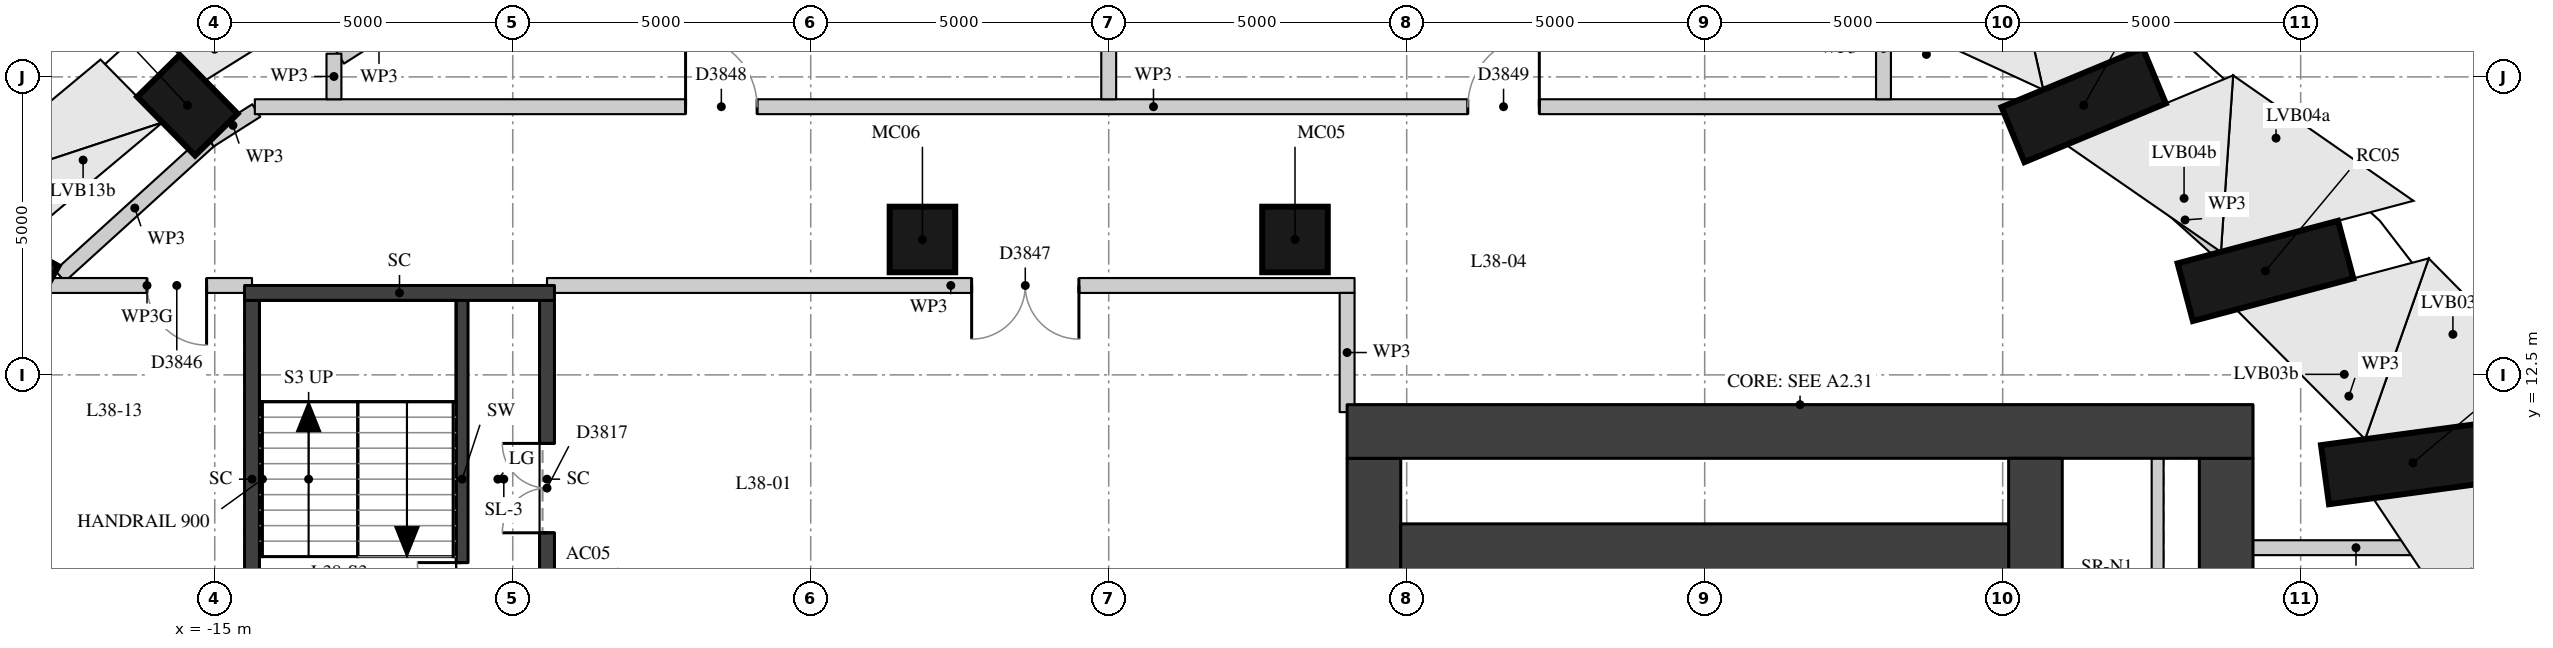
"""IFC4 building model, lengths in metres.
Left out: names, types, materials, properties, quantities, classifications, styles, units other than length and angle.
Written with IfcOpenShell. Run it as: python <this file> out.ifc"""

import sys

from ifc_helpers import new_model, si_unit, direction, frame, frame_2d, origin, origin_2d, place, context, subcontext, project, spatial, rectangle, extrude, element, fill, save


model = new_model("IFC4")
c1 = context("Model", 3, precision=1e-05, world=origin(), true_north=direction((0.0, 1.0)))
c2 = subcontext(c1, "Body", "Model", "MODEL_VIEW")
j1 = project(units=[si_unit("LENGTHUNIT", "METRE"), si_unit("PLANEANGLEUNIT", "RADIAN")], contexts=[c1])
p1 = place(None, origin())
s1 = spatial("IfcSite", under=j1, at=p1, CompositionType="ELEMENT")
p2 = place(p1, origin())
s2 = spatial("IfcBuilding", under=s1, at=p2, CompositionType="ELEMENT")
p3 = place(p2, frame((0.0, 0.0, 135.1)))
s3 = spatial("IfcBuildingStorey", under=s2, at=p3, CompositionType="ELEMENT", Elevation=135.1)
p4 = place(p3, frame((23.36, 11.225, 0.483), z_axis=(-0.638714852025, -0.08658839061, 0.764555941978), x_axis=(0.757625702782, 0.102708728442, 0.644557376489)))
e1 = element("IfcColumn", 1, at=p4, inside=s3, PredefinedType="COLUMN", context=c2, shape_type="SweptSolid", body=[
    extrude(rectangle(XDim=1.5, YDim=1.0, at=origin_2d()), origin(), (0.0, 0.0, 1.0), 4.621),
])
p5 = place(p3, frame((20.755, 14.602, 0.46), z_axis=(-0.593567438893, -0.157530913941, 0.789215880883), x_axis=(0.7628085794, 0.202446975358, 0.614115863141)))
e2 = element("IfcColumn", 2, at=p5, inside=s3, PredefinedType="COLUMN", context=c2, shape_type="SweptSolid", body=[
    extrude(rectangle(XDim=1.5, YDim=1.0, at=origin_2d()), origin(), (0.0, 0.0, 1.0), 4.535),
])
p6 = place(p3, frame((17.545, 17.517, 0.433), z_axis=(-0.532872454376, -0.221367276167, 0.816727296232), x_axis=(0.754234818577, 0.313326211568, 0.577023850105)))
e3 = element("IfcColumn", 3, at=p6, inside=s3, PredefinedType="COLUMN", context=c2, shape_type="SweptSolid", body=[
    extrude(rectangle(XDim=1.5, YDim=1.0, at=origin_2d()), origin(), (0.0, 0.0, 1.0), 4.45),
])
p7 = place(p3, frame((13.825, 19.882, 0.4), z_axis=(-0.457164324524, -0.275515169699, 0.845631226746), x_axis=(0.724271094402, 0.436490038216, 0.533767578962)))
e4 = element("IfcColumn", 4, at=p7, inside=s3, PredefinedType="COLUMN", context=c2, shape_type="SweptSolid", body=[
    extrude(rectangle(XDim=1.5, YDim=1.0, at=origin_2d()), origin(), (0.0, 0.0, 1.0), 4.375),
])
p8 = place(p3, frame((-12.225, 19.882, 0.238), z_axis=(0.141417418826, -0.284043041801, 0.948325188982), x_axis=(-0.422658902725, 0.848928805027, 0.317300072397)))
e5 = element("IfcColumn", 5, at=p8, inside=s3, PredefinedType="COLUMN", context=c2, shape_type="SweptSolid", body=[
    extrude(rectangle(XDim=1.5, YDim=1.0, at=origin_2d()), origin(), (0.0, 0.0, 1.0), 4.243),
])
p9 = place(p3, frame((-15.945, 17.517, 0.244), z_axis=(0.228901450593, -0.232181335632, 0.945354935091), x_axis=(-0.663694994095, 0.673204952532, 0.326043013572)))
e6 = element("IfcColumn", 6, at=p9, inside=s3, PredefinedType="COLUMN", context=c2, shape_type="SweptSolid", body=[
    extrude(rectangle(XDim=1.5, YDim=1.0, at=origin_2d()), origin(), (0.0, 0.0, 1.0), 4.243),
])
p10 = place(p3, frame((-19.156, 14.602, 0.261), z_axis=(0.304420915631, -0.168349196586, 0.937542774563), x_axis=(-0.820443324529, 0.453717098388, 0.347870012886)))
e7 = element("IfcColumn", 7, at=p10, inside=s3, PredefinedType="COLUMN", context=c2, shape_type="SweptSolid", body=[
    extrude(rectangle(XDim=1.5, YDim=1.0, at=origin_2d()), origin(), (0.0, 0.0, 1.0), 4.243),
])
for number, where, z_axis, x_axis in (
    (8, (3.126, 14.772, 0.0), (0.0, 0.0, 1.0), (1.0, 0.0, 0.0)),
    (9, (-3.126, 14.772, 0.0), (0.0, 0.0, 1.0), (1.0, 0.0, 0.0)),
):
    element("IfcColumn", number, at=place(p3, frame(where, z_axis=z_axis, x_axis=x_axis)), inside=s3, PredefinedType="COLUMN", context=c2, shape_type="SweptSolid", body=[
        extrude(rectangle(XDim=1.1, YDim=1.1, at=origin_2d()), origin(), (0.0, 0.0, 1.0), 4.5),
    ])
p11 = place(p3, frame((4.45, -11.1, 0.0), z_axis=(0.0, 0.0, 1.0), x_axis=(0.0, 1.0, 0.0)))
e10 = element("IfcWall", 10, at=p11, inside=s3, PredefinedType="SHEAR", context=c2, shape_type="SweptSolid", body=[
    extrude(rectangle(XDim=22.2, YDim=0.9, at=frame_2d((11.1, 0.0))), origin(), (0.0, 0.0, 1.0), 4.09),
])
p12 = place(p11, frame((2.35, 0.0, 0.0)))
e11 = element("IfcOpeningElement", 11, at=p12, cuts=e10, PredefinedType="OPENING", context=c2, shape_type="SweptSolid", body=[
    extrude(rectangle(XDim=1.5, YDim=2.1, at=frame_2d((0.75, 1.05))), frame((0.0, 0.46, 0.0), z_axis=(0.0, -1.0, 0.0), x_axis=(1.0, 0.0, 0.0)), (0.0, 0.0, 1.0), 0.92),
])
p13 = place(p11, frame((5.45, 0.0, 0.0)))
e12 = element("IfcOpeningElement", 12, at=p13, cuts=e10, PredefinedType="OPENING", context=c2, shape_type="SweptSolid", body=[
    extrude(rectangle(XDim=1.8, YDim=2.1, at=frame_2d((0.9, 1.05))), frame((0.0, 0.46, 0.0), z_axis=(0.0, -1.0, 0.0), x_axis=(1.0, 0.0, 0.0)), (0.0, 0.0, 1.0), 0.92),
])
p14 = place(p11, frame((7.95, 0.0, 0.0)))
e13 = element("IfcOpeningElement", 13, at=p14, cuts=e10, PredefinedType="OPENING", context=c2, shape_type="SweptSolid", body=[
    extrude(rectangle(XDim=1.1, YDim=2.1, at=frame_2d((0.55, 1.05))), frame((0.0, 0.46, 0.0), z_axis=(0.0, -1.0, 0.0), x_axis=(1.0, 0.0, 0.0)), (0.0, 0.0, 1.0), 0.92),
])
p15 = place(p11, frame((10.6, 0.0, 0.0)))
e14 = element("IfcOpeningElement", 14, at=p15, cuts=e10, PredefinedType="OPENING", context=c2, shape_type="SweptSolid", body=[
    extrude(rectangle(XDim=1.0, YDim=2.1, at=frame_2d((0.5, 1.05))), frame((0.0, 0.46, 0.0), z_axis=(0.0, -1.0, 0.0), x_axis=(1.0, 0.0, 0.0)), (0.0, 0.0, 1.0), 0.92),
])
p16 = place(p11, frame((13.15, 0.0, 0.0)))
e15 = element("IfcOpeningElement", 15, at=p16, cuts=e10, PredefinedType="OPENING", context=c2, shape_type="SweptSolid", body=[
    extrude(rectangle(XDim=1.1, YDim=2.1, at=frame_2d((0.55, 1.05))), frame((0.0, 0.46, 0.0), z_axis=(0.0, -1.0, 0.0), x_axis=(1.0, 0.0, 0.0)), (0.0, 0.0, 1.0), 0.92),
])
p17 = place(p11, frame((14.95, 0.0, 0.0)))
e16 = element("IfcOpeningElement", 16, at=p17, cuts=e10, PredefinedType="OPENING", context=c2, shape_type="SweptSolid", body=[
    extrude(rectangle(XDim=1.8, YDim=2.1, at=frame_2d((0.9, 1.05))), frame((0.0, 0.46, 0.0), z_axis=(0.0, -1.0, 0.0), x_axis=(1.0, 0.0, 0.0)), (0.0, 0.0, 1.0), 0.92),
])
p18 = place(p11, frame((18.35, 0.0, 0.0)))
e17 = element("IfcOpeningElement", 17, at=p18, cuts=e10, PredefinedType="OPENING", context=c2, shape_type="SweptSolid", body=[
    extrude(rectangle(XDim=1.5, YDim=2.1, at=frame_2d((0.75, 1.05))), frame((0.0, 0.46, 0.0), z_axis=(0.0, -1.0, 0.0), x_axis=(1.0, 0.0, 0.0)), (0.0, 0.0, 1.0), 0.92),
])
p19 = place(p3, frame((18.75, -11.1, 0.0), z_axis=(0.0, 0.0, 1.0), x_axis=(0.0, 1.0, 0.0)))
e18 = element("IfcWall", 18, at=p19, inside=s3, PredefinedType="SHEAR", context=c2, shape_type="SweptSolid", body=[
    extrude(rectangle(XDim=22.2, YDim=0.9, at=frame_2d((11.1, 0.0))), origin(), (0.0, 0.0, 1.0), 4.09),
])
p20 = place(p3, frame((4.0, 11.55, 0.0), z_axis=(0.0, 0.0, 1.0), x_axis=(1.0, 0.0, 0.0)))
e19 = element("IfcWall", 19, at=p20, inside=s3, PredefinedType="SHEAR", context=c2, shape_type="SweptSolid", body=[
    extrude(rectangle(XDim=15.2, YDim=0.9, at=frame_2d((7.6, 0.0))), origin(), (0.0, 0.0, 1.0), 4.09),
])
p21 = place(p3, frame((15.55, -11.1, 0.0), z_axis=(0.0, 0.0, 1.0), x_axis=(0.0, 1.0, 0.0)))
e20 = element("IfcWall", 20, at=p21, inside=s3, PredefinedType="SHEAR", context=c2, shape_type="SweptSolid", body=[
    extrude(rectangle(XDim=22.2, YDim=0.9, at=frame_2d((11.1, 0.0))), origin(), (0.0, 0.0, 1.0), 4.09),
])
p22 = place(p21, frame((15.6, 0.0, 0.0)))
e21 = element("IfcOpeningElement", 21, at=p22, cuts=e20, PredefinedType="OPENING", context=c2, shape_type="SweptSolid", body=[
    extrude(rectangle(XDim=1.0, YDim=2.1, at=frame_2d((0.5, 1.05))), frame((0.0, 0.46, 0.0), z_axis=(0.0, -1.0, 0.0), x_axis=(1.0, 0.0, 0.0)), (0.0, 0.0, 1.0), 0.92),
])
p23 = place(p21, frame((5.6, 0.0, 0.0)))
e22 = element("IfcOpeningElement", 22, at=p23, cuts=e20, PredefinedType="OPENING", context=c2, shape_type="SweptSolid", body=[
    extrude(rectangle(XDim=1.0, YDim=2.1, at=frame_2d((0.5, 1.05))), frame((0.0, 0.46, 0.0), z_axis=(0.0, -1.0, 0.0), x_axis=(1.0, 0.0, 0.0)), (0.0, 0.0, 1.0), 0.92),
])
p24 = place(p3, frame((4.9, 9.55, 0.0), z_axis=(0.0, 0.0, 1.0), x_axis=(1.0, 0.0, 0.0)))
e23 = element("IfcWall", 23, at=p24, inside=s3, PredefinedType="SHEAR", context=c2, shape_type="SweptSolid", body=[
    extrude(rectangle(XDim=10.2, YDim=0.9, at=frame_2d((5.1, 0.0))), origin(), (0.0, 0.0, 1.0), 4.09),
])
p25 = place(p3, frame((-10.85, 7.75, 0.0), z_axis=(0.0, 0.0, 1.0), x_axis=(0.0, 1.0, 0.0)))
e24 = element("IfcWall", 24, at=p25, inside=s3, PredefinedType="SHEAR", context=c2, shape_type="SweptSolid", body=[
    extrude(rectangle(XDim=6.0, YDim=0.2, at=frame_2d((3.0, 0.0))), origin(), (0.0, 0.0, 1.0), 4.09),
])
p26 = place(p25, frame((0.1, 0.0, 0.0)))
e25 = element("IfcOpeningElement", 25, at=p26, cuts=e24, PredefinedType="OPENING", context=c2, shape_type="SweptSolid", body=[
    extrude(rectangle(XDim=1.5, YDim=2.1, at=frame_2d((0.75, 1.05))), frame((0.0, 0.11, 0.0), z_axis=(0.0, -1.0, 0.0), x_axis=(1.0, 0.0, 0.0)), (0.0, 0.0, 1.0), 0.22),
])
p27 = place(p3, frame((17.6, 6.4, 0.0), z_axis=(0.0, 0.0, 1.0), x_axis=(0.0, 1.0, 0.0)))
e26 = element("IfcWall", 26, at=p27, inside=s3, PredefinedType="PARTITIONING", context=c2, shape_type="SweptSolid", body=[
    extrude(rectangle(XDim=4.7, YDim=0.2, at=frame_2d((2.35, 0.0))), origin(), (0.0, 0.0, 1.0), 4.09),
])
p28 = place(p3, frame((-14.375, 7.75, -0.45), z_axis=(0.0, 0.0, 1.0), x_axis=(0.0, 1.0, 0.0)))
e27 = element("IfcWall", 27, at=p28, inside=s3, PredefinedType="SHEAR", context=c2, shape_type="SweptSolid", body=[
    extrude(rectangle(XDim=6.0, YDim=0.25, at=frame_2d((3.0, 0.0))), origin(), (0.0, 0.0, 1.0), 4.54),
])
p29 = place(p3, frame((-9.425, 7.75, -0.45), z_axis=(0.0, 0.0, 1.0), x_axis=(0.0, 1.0, 0.0)))
e28 = element("IfcWall", 28, at=p29, inside=s3, PredefinedType="SHEAR", context=c2, shape_type="SweptSolid", body=[
    extrude(rectangle(XDim=6.0, YDim=0.25, at=frame_2d((3.0, 0.0))), origin(), (0.0, 0.0, 1.0), 4.54),
])
p30 = place(p29, frame((2.1, 0.0, 0.45)))
e29 = element("IfcOpeningElement", 29, at=p30, cuts=e28, PredefinedType="OPENING", context=c2, shape_type="SweptSolid", body=[
    extrude(rectangle(XDim=1.5, YDim=2.1, at=frame_2d((0.75, 1.05))), frame((0.0, 0.135, 0.0), z_axis=(0.0, -1.0, 0.0), x_axis=(1.0, 0.0, 0.0)), (0.0, 0.0, 1.0), 0.27),
])
p31 = place(p3, frame((-14.5, 13.875, -0.45), z_axis=(0.0, 0.0, 1.0), x_axis=(1.0, 0.0, 0.0)))
e30 = element("IfcWall", 30, at=p31, inside=s3, PredefinedType="SHEAR", context=c2, shape_type="SweptSolid", body=[
    extrude(rectangle(XDim=5.2, YDim=0.25, at=frame_2d((2.6, 0.0))), origin(), (0.0, 0.0, 1.0), 4.54),
])
p32 = place(p3, frame((-15.086, 16.438, 0.0), z_axis=(0.0, 0.0, 1.0), x_axis=(-0.740584857479, -0.671962847836, 0.0)))
e31 = element("IfcWall", 31, at=p32, inside=s3, PredefinedType="PARTITIONING", context=c2, shape_type="SweptSolid", body=[
    extrude(rectangle(XDim=3.391, YDim=0.25, at=frame_2d((1.695, 0.0))), origin(), (0.0, 0.0, 1.0), 4.09),
])
p33 = place(p3, frame((-14.303, 16.936, 0.0), z_axis=(0.0, 0.0, 1.0), x_axis=(-0.843921523767, -0.536466645489, 0.0)))
e32 = element("IfcWall", 32, at=p33, inside=s3, PredefinedType="PARTITIONING", context=c2, shape_type="SweptSolid", body=[
    extrude(rectangle(XDim=0.927, YDim=0.25, at=frame_2d((0.464, 0.0))), origin(), (0.0, 0.0, 1.0), 4.09),
])
p34 = place(p3, frame((19.579, 13.729, 0.0), z_axis=(0.0, 0.0, 1.0), x_axis=(-0.742177331878, 0.670203557172, 0.0)))
e33 = element("IfcWall", 33, at=p34, inside=s3, PredefinedType="PARTITIONING", context=c2, shape_type="SweptSolid", body=[
    extrude(rectangle(XDim=4.091, YDim=0.25, at=frame_2d((2.045, 0.0))), origin(), (0.0, 0.0, 1.0), 4.09),
])
p35 = place(p3, frame((22.039, 10.556, 0.0), z_axis=(0.0, 0.0, 1.0), x_axis=(-0.612824294298, 0.79021920017, 0.0)))
e34 = element("IfcWall", 34, at=p35, inside=s3, PredefinedType="PARTITIONING", context=c2, shape_type="SweptSolid", body=[
    extrude(rectangle(XDim=4.015, YDim=0.25, at=frame_2d((2.007, 0.0))), origin(), (0.0, 0.0, 1.0), 4.09),
])
p36 = place(p3, frame((-11.589, 18.662, 0.0), z_axis=(0.0, 0.0, 1.0), x_axis=(-0.843810409239, -0.536641400993, 0.0)))
e35 = element("IfcWall", 35, at=p36, inside=s3, PredefinedType="PARTITIONING", context=c2, shape_type="SweptSolid", body=[
    extrude(rectangle(XDim=1.552, YDim=0.25, at=frame_2d((0.776, 0.0))), origin(), (0.0, 0.0, 1.0), 4.09),
])
p37 = place(p3, frame((19.198, 9.6, 0.0), z_axis=(0.0, 0.0, 1.0), x_axis=(1.0, 0.0, 0.0)))
e36 = element("IfcWall", 36, at=p37, inside=s3, PredefinedType="PARTITIONING", context=c2, shape_type="SweptSolid", body=[
    extrude(rectangle(XDim=3.46, YDim=0.25, at=frame_2d((1.73, 0.0))), origin(), (0.0, 0.0, 1.0), 4.09),
])
p38 = place(p3, frame((-17.898, 14.0, 0.0), z_axis=(0.0, 0.0, 1.0), x_axis=(1.0, 0.0, 0.0)))
e37 = element("IfcWall", 37, at=p38, inside=s3, PredefinedType="PARTITIONING", context=c2, shape_type="SweptSolid", body=[
    extrude(rectangle(XDim=3.523, YDim=0.25, at=frame_2d((1.762, 0.0))), origin(), (0.0, 0.0, 1.0), 3.64),
])
p39 = place(p38, frame((1.761, 0.0, 0.0)))
e38 = element("IfcOpeningElement", 38, at=p39, cuts=e37, PredefinedType="OPENING", context=c2, shape_type="SweptSolid", body=[
    extrude(rectangle(XDim=1.0, YDim=2.1, at=frame_2d((0.5, 1.05))), frame((0.0, 0.135, 0.0), z_axis=(0.0, -1.0, 0.0), x_axis=(1.0, 0.0, 0.0)), (0.0, 0.0, 1.0), 0.27),
])
p40 = place(p3, frame((-9.425, 14.0, 0.0), z_axis=(0.0, 0.0, 1.0), x_axis=(1.0, 0.0, 0.0)))
e39 = element("IfcWall", 39, at=p40, inside=s3, PredefinedType="PARTITIONING", context=c2, shape_type="SweptSolid", body=[
    extrude(rectangle(XDim=13.55, YDim=0.25, at=frame_2d((6.775, 0.0))), origin(), (0.0, 0.0, 1.0), 4.09),
])
p41 = place(p40, frame((7.125, 0.0, 0.0)))
e40 = element("IfcOpeningElement", 40, at=p41, cuts=e39, PredefinedType="OPENING", context=c2, shape_type="SweptSolid", body=[
    extrude(rectangle(XDim=1.8, YDim=2.1, at=frame_2d((0.9, 1.05))), frame((0.0, 0.135, 0.0), z_axis=(0.0, -1.0, 0.0), x_axis=(1.0, 0.0, 0.0)), (0.0, 0.0, 1.0), 0.27),
])
p42 = place(p3, frame((-14.327, 17.0, 0.0), z_axis=(0.0, 0.0, 1.0), x_axis=(1.0, 0.0, 0.0)))
e41 = element("IfcWall", 41, at=p42, inside=s3, PredefinedType="PARTITIONING", context=c2, shape_type="SweptSolid", body=[
    extrude(rectangle(XDim=30.157, YDim=0.25, at=frame_2d((15.079, 0.0))), origin(), (0.0, 0.0, 1.0), 4.09),
])
p43 = place(p42, frame((7.228, 0.0, 0.0)))
e42 = element("IfcOpeningElement", 42, at=p43, cuts=e41, PredefinedType="OPENING", context=c2, shape_type="SweptSolid", body=[
    extrude(rectangle(XDim=1.2, YDim=2.1, at=frame_2d((0.6, 1.05))), frame((0.0, 0.135, 0.0), z_axis=(0.0, -1.0, 0.0), x_axis=(1.0, 0.0, 0.0)), (0.0, 0.0, 1.0), 0.27),
])
p44 = place(p42, frame((20.353, 0.0, 0.0)))
e43 = element("IfcOpeningElement", 43, at=p44, cuts=e41, PredefinedType="OPENING", context=c2, shape_type="SweptSolid", body=[
    extrude(rectangle(XDim=1.2, YDim=2.1, at=frame_2d((0.6, 1.05))), frame((0.0, 0.135, 0.0), z_axis=(0.0, -1.0, 0.0), x_axis=(1.0, 0.0, 0.0)), (0.0, 0.0, 1.0), 0.27),
])
p45 = place(p3, frame((-13.0, 17.125, 0.0), z_axis=(0.0, 0.0, 1.0), x_axis=(0.0, 1.0, 0.0)))
e44 = element("IfcWall", 44, at=p45, inside=s3, PredefinedType="PARTITIONING", context=c2, shape_type="SweptSolid", body=[
    extrude(rectangle(XDim=0.765, YDim=0.25, at=frame_2d((0.382, 0.0))), origin(), (0.0, 0.0, 1.0), 4.09),
])
p46 = place(p3, frame((0.0, 17.125, 0.0), z_axis=(0.0, 0.0, 1.0), x_axis=(0.0, 1.0, 0.0)))
e45 = element("IfcWall", 45, at=p46, inside=s3, PredefinedType="PARTITIONING", context=c2, shape_type="SweptSolid", body=[
    extrude(rectangle(XDim=4.607, YDim=0.25, at=frame_2d((2.304, 0.0))), origin(), (0.0, 0.0, 1.0), 3.64),
])
p47 = place(p3, frame((4.0, 11.875, 0.0), z_axis=(0.0, 0.0, 1.0), x_axis=(0.0, 1.0, 0.0)))
e46 = element("IfcWall", 46, at=p47, inside=s3, PredefinedType="PARTITIONING", context=c2, shape_type="SweptSolid", body=[
    extrude(rectangle(XDim=2.0, YDim=0.25, at=frame_2d((1.0, 0.0))), origin(), (0.0, 0.0, 1.0), 4.09),
])
p48 = place(p3, frame((13.0, 17.125, 0.0), z_axis=(0.0, 0.0, 1.0), x_axis=(0.0, 1.0, 0.0)))
e47 = element("IfcWall", 47, at=p48, inside=s3, PredefinedType="PARTITIONING", context=c2, shape_type="SweptSolid", body=[
    extrude(rectangle(XDim=1.705, YDim=0.25, at=frame_2d((0.853, 0.0))), origin(), (0.0, 0.0, 1.0), 4.09),
])
p49 = place(p26, origin())
e48 = element("IfcDoor", 48, at=p49, inside=s3, OperationType="DOUBLE_DOOR_SINGLE_SWING", PredefinedType="DOOR", context=c2, shape_type="SweptSolid", body=[
    extrude(rectangle(XDim=1.5, YDim=2.1, at=frame_2d((0.75, 1.05))), frame((0.0, 0.025, 0.0), z_axis=(0.0, -1.0, 0.0), x_axis=(1.0, 0.0, 0.0)), (0.0, 0.0, 1.0), 0.05),
])
fill(e25, e48)
p50 = place(p30, origin())
e49 = element("IfcDoor", 49, at=p50, inside=s3, OperationType="DOUBLE_DOOR_SINGLE_SWING", PredefinedType="DOOR", context=c2, shape_type="SweptSolid", body=[
    extrude(rectangle(XDim=1.5, YDim=2.1, at=frame_2d((0.75, 1.05))), frame((0.0, 0.025, 0.0), z_axis=(0.0, -1.0, 0.0), x_axis=(1.0, 0.0, 0.0)), (0.0, 0.0, 1.0), 0.05),
])
fill(e29, e49)
p51 = place(p43, origin())
e50 = element("IfcDoor", 50, at=p51, inside=s3, OperationType="SINGLE_SWING_LEFT", PredefinedType="DOOR", context=c2, shape_type="SweptSolid", body=[
    extrude(rectangle(XDim=1.2, YDim=2.1, at=frame_2d((0.6, 1.05))), frame((0.0, 0.025, 0.0), z_axis=(0.0, -1.0, 0.0), x_axis=(1.0, 0.0, 0.0)), (0.0, 0.0, 1.0), 0.05),
])
fill(e42, e50)
p52 = place(p44, origin())
e51 = element("IfcDoor", 51, at=p52, inside=s3, OperationType="SINGLE_SWING_RIGHT", PredefinedType="DOOR", context=c2, shape_type="SweptSolid", body=[
    extrude(rectangle(XDim=1.2, YDim=2.1, at=frame_2d((0.6, 1.05))), frame((0.0, 0.025, 0.0), z_axis=(0.0, -1.0, 0.0), x_axis=(1.0, 0.0, 0.0)), (0.0, 0.0, 1.0), 0.05),
])
fill(e43, e51)
p53 = place(p41, origin())
e52 = element("IfcDoor", 52, at=p53, inside=s3, OperationType="DOUBLE_DOOR_SINGLE_SWING", PredefinedType="DOOR", context=c2, shape_type="SweptSolid", body=[
    extrude(rectangle(XDim=1.8, YDim=2.1, at=frame_2d((0.9, 1.05))), frame((0.0, 0.025, 0.0), z_axis=(0.0, -1.0, 0.0), x_axis=(1.0, 0.0, 0.0)), (0.0, 0.0, 1.0), 0.05),
])
fill(e40, e52)
p54 = place(p39, origin())
e53 = element("IfcDoor", 53, at=p54, inside=s3, OperationType="SINGLE_SWING_LEFT", PredefinedType="DOOR", context=c2, shape_type="SweptSolid", body=[
    extrude(rectangle(XDim=1.0, YDim=2.1, at=frame_2d((0.5, 1.05))), frame((0.0, 0.025, 0.0), z_axis=(0.0, -1.0, 0.0), x_axis=(1.0, 0.0, 0.0)), (0.0, 0.0, 1.0), 0.05),
])
fill(e38, e53)
save(model, sys.argv[1])
